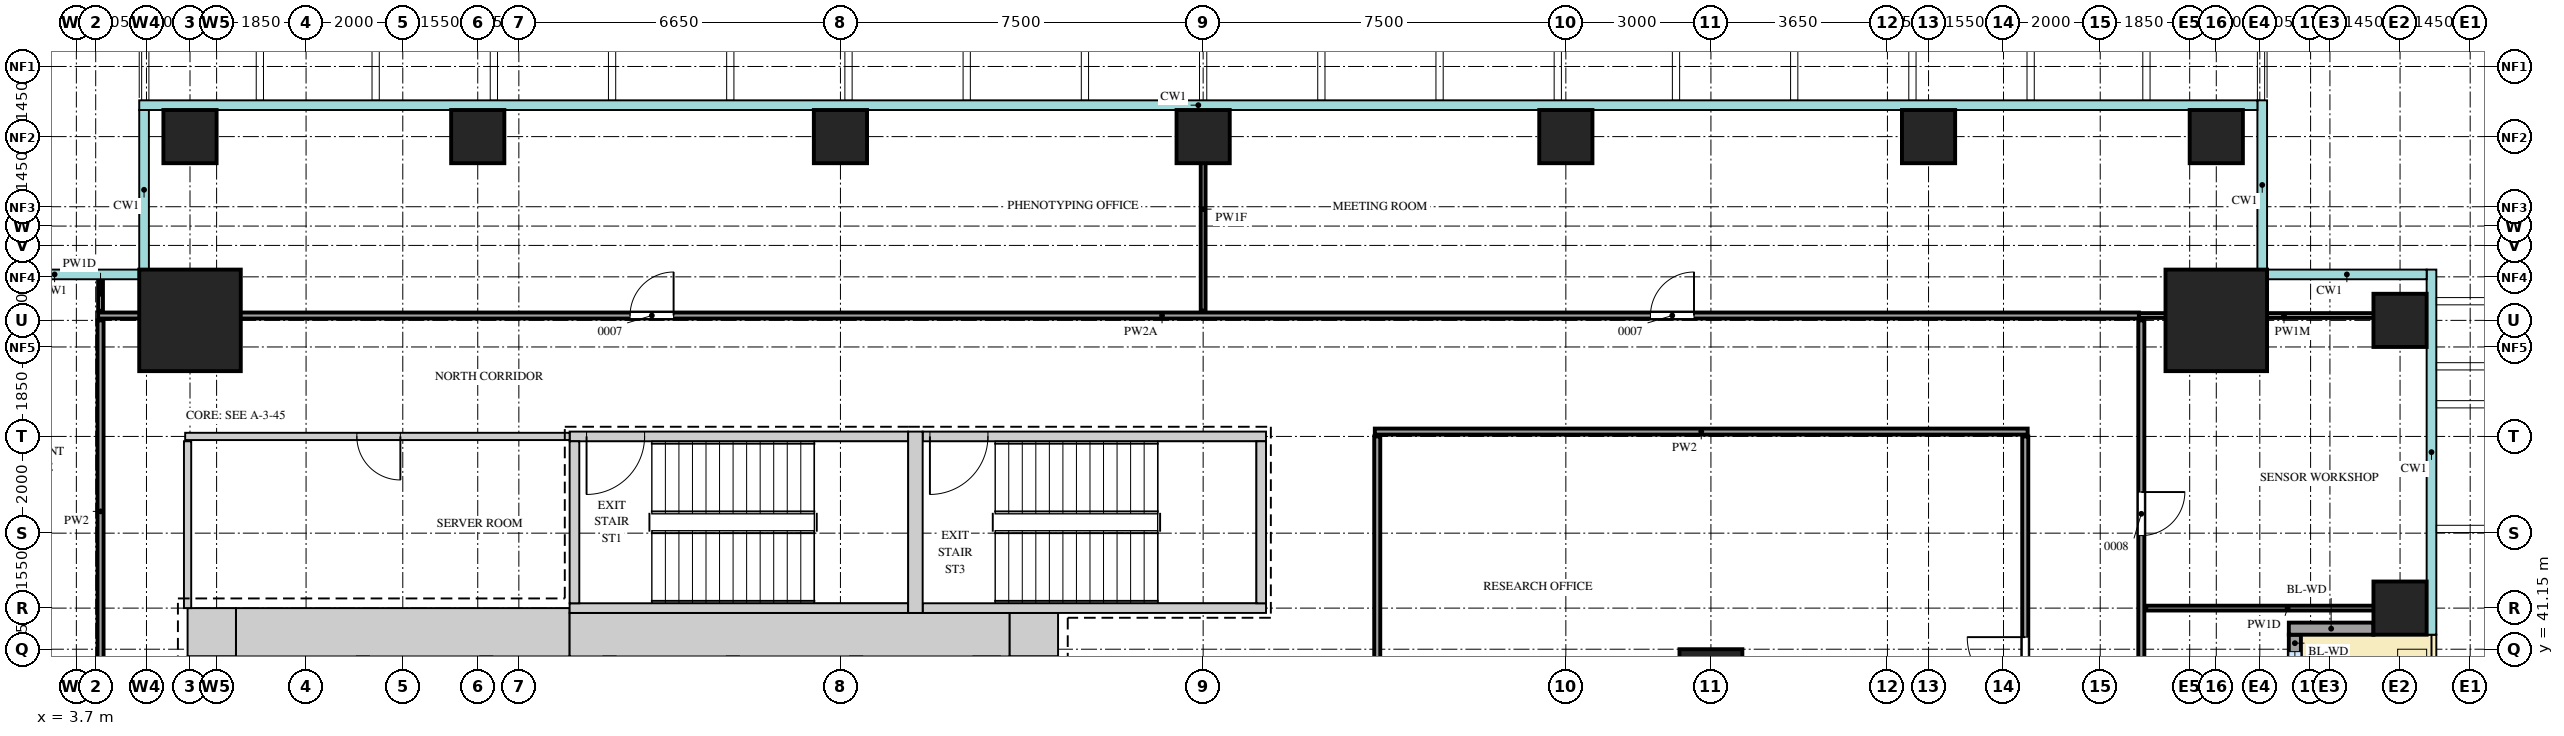
"""IFC4 building model, lengths in metres.
Left out: names, types, materials, properties, quantities, classifications, styles, units other than length and angle.
Written with IfcOpenShell. Run it as: python <this file> out.ifc"""

import sys

from ifc_helpers import new_model, si_unit, direction, frame, frame_2d, origin, origin_2d, place, context, subcontext, project, spatial, rectangle, extrude, source, transform, mapped, element, fill, save


model = new_model("IFC4")
c1 = context("Model", 3, precision=1e-05, world=origin(), true_north=direction((0.0, 1.0)))
c2 = subcontext(c1, "Body", "Model", "MODEL_VIEW")
j1 = project(units=[si_unit("LENGTHUNIT", "METRE"), si_unit("PLANEANGLEUNIT", "RADIAN")], contexts=[c1])
p1 = place(None, origin())
s1 = spatial("IfcSite", under=j1, at=p1, CompositionType="ELEMENT")
p2 = place(p1, origin())
s2 = spatial("IfcBuilding", under=s1, at=p2, CompositionType="ELEMENT")
p3 = place(p2, frame((0.0, 0.0, 127.9)))
s3 = spatial("IfcBuildingStorey", under=s2, at=p3, CompositionType="ELEMENT", Elevation=127.9)
m1 = source(origin(), c2, "Body", "SweptSolid", [
    extrude(rectangle(XDim=6.9, YDim=1.0, at=frame_2d((3.45, 0.0))), origin(), (0.0, 0.0, 1.0), 4.1),
])
p4 = place(p3, frame((7.0, 41.5, 0.0), z_axis=(0.0, 0.0, 1.0), x_axis=(1.0, 0.0, 0.0)))
e1 = element("IfcWall", 1, at=p4, inside=s3, PredefinedType="SHEAR", context=c2, shape_type="MappedRepresentation", body=[
    mapped(m1, transform((0.0, 0.0, 0.0))),
])
m2 = source(origin(), c2, "Body", "SweptSolid", [
    extrude(rectangle(XDim=9.1, YDim=0.9, at=frame_2d((4.55, 0.0))), origin(), (0.0, 0.0, 1.0), 4.1),
])
p5 = place(p3, frame((13.9, 41.45, 0.0), z_axis=(0.0, 0.0, 1.0), x_axis=(1.0, 0.0, 0.0)))
e2 = element("IfcWall", 2, at=p5, inside=s3, PredefinedType="SHEAR", context=c2, shape_type="MappedRepresentation", body=[
    mapped(m2, transform((0.0, 0.0, 0.0))),
])
m3 = source(origin(), c2, "Body", "SweptSolid", [
    extrude(rectangle(XDim=1.0, YDim=0.9, at=frame_2d((0.5, 0.0))), origin(), (0.0, 0.0, 1.0), 4.1),
])
p6 = place(p3, frame((23.0, 41.45, 0.0), z_axis=(0.0, 0.0, 1.0), x_axis=(1.0, 0.0, 0.0)))
e3 = element("IfcWall", 3, at=p6, inside=s3, PredefinedType="SHEAR", context=c2, shape_type="MappedRepresentation", body=[
    mapped(m3, transform((0.0, 0.0, 0.0))),
])
m4 = source(origin(), c2, "Body", "SweptSolid", [
    extrude(rectangle(XDim=1.0, YDim=1.0, at=frame_2d((0.5, 0.0))), origin(), (0.0, 0.0, 1.0), 4.1),
])
p7 = place(p3, frame((6.0, 41.5, 0.0), z_axis=(0.0, 0.0, 1.0), x_axis=(1.0, 0.0, 0.0)))
e4 = element("IfcWall", 4, at=p7, inside=s3, PredefinedType="SHEAR", context=c2, shape_type="MappedRepresentation", body=[
    mapped(m4, transform((0.0, 0.0, 0.0))),
])
m5 = source(origin(), c2, "Body", "SweptSolid", [
    extrude(rectangle(XDim=7.0, YDim=0.2, at=frame_2d((3.5, 0.0))), origin(), (0.0, 0.0, 1.0), 4.1),
])
p8 = place(p3, frame((13.9, 45.55, 0.0), z_axis=(0.0, 0.0, 1.0), x_axis=(1.0, 0.0, 0.0)))
e5 = element("IfcWall", 5, at=p8, inside=s3, PredefinedType="SHEAR", context=c2, shape_type="MappedRepresentation", body=[
    mapped(m5, transform((0.0, 0.0, 0.0))),
])
m6 = source(origin(), c2, "Body", "SweptSolid", [
    extrude(rectangle(XDim=1.2, YDim=2.1, at=frame_2d((0.6, 1.05))), frame((0.0, 0.11, 0.0), z_axis=(0.0, -1.0, 0.0), x_axis=(1.0, 0.0, 0.0)), (0.0, 0.0, 1.0), 0.22),
])
p9 = place(p8, frame((0.35, 0.0, 0.0)))
e6 = element("IfcOpeningElement", 6, at=p9, cuts=e5, PredefinedType="OPENING", context=c2, shape_type="MappedRepresentation", body=[
    mapped(m6, transform((0.0, 0.0, 0.0))),
])
p10 = place(p3, frame((13.9, 42.0, 0.0), z_axis=(0.0, 0.0, 1.0), x_axis=(1.0, 0.0, 0.0)))
e7 = element("IfcWall", 7, at=p10, inside=s3, PredefinedType="SHEAR", context=c2, shape_type="MappedRepresentation", body=[
    mapped(m5, transform((0.0, 0.0, 0.0))),
])
m7 = source(origin(), c2, "Body", "SweptSolid", [
    extrude(rectangle(XDim=7.1, YDim=0.2, at=frame_2d((3.55, 0.0))), origin(), (0.0, 0.0, 1.0), 4.1),
])
p11 = place(p3, frame((21.2, 45.55, 0.0), z_axis=(0.0, 0.0, 1.0), x_axis=(1.0, 0.0, 0.0)))
e8 = element("IfcWall", 8, at=p11, inside=s3, PredefinedType="SHEAR", context=c2, shape_type="MappedRepresentation", body=[
    mapped(m7, transform((0.0, 0.0, 0.0))),
])
p12 = place(p11, frame((0.15, 0.0, 0.0)))
e9 = element("IfcOpeningElement", 9, at=p12, cuts=e8, PredefinedType="OPENING", context=c2, shape_type="MappedRepresentation", body=[
    mapped(m6, transform((0.0, 0.0, 0.0))),
])
p13 = place(p3, frame((21.2, 42.0, 0.0), z_axis=(0.0, 0.0, 1.0), x_axis=(1.0, 0.0, 0.0)))
e10 = element("IfcWall", 10, at=p13, inside=s3, PredefinedType="SHEAR", context=c2, shape_type="MappedRepresentation", body=[
    mapped(m7, transform((0.0, 0.0, 0.0))),
])
m8 = source(origin(), c2, "Body", "SweptSolid", [
    extrude(rectangle(XDim=3.75, YDim=0.3, at=frame_2d((1.875, 0.0))), origin(), (0.0, 0.0, 1.0), 4.1),
])
p14 = place(p3, frame((21.05, 41.9, 0.0), z_axis=(0.0, 0.0, 1.0), x_axis=(0.0, 1.0, 0.0)))
e11 = element("IfcWall", 11, at=p14, inside=s3, PredefinedType="SHEAR", context=c2, shape_type="MappedRepresentation", body=[
    mapped(m8, transform((0.0, 0.0, 0.0))),
])
m9 = source(origin(), c2, "Body", "SweptSolid", [
    extrude(rectangle(XDim=3.35, YDim=0.2, at=frame_2d((1.675, 0.0))), origin(), (0.0, 0.0, 1.0), 4.1),
])
for number, where, z_axis, x_axis in (
    (12, (14.0, 42.1, 0.0), (0.0, 0.0, 1.0), (0.0, 1.0, 0.0)),
    (13, (28.2, 42.1, 0.0), (0.0, 0.0, 1.0), (0.0, 1.0, 0.0)),
):
    element("IfcWall", number, at=place(p3, frame(where, z_axis=z_axis, x_axis=x_axis)), inside=s3, PredefinedType="SHEAR", context=c2, shape_type="MappedRepresentation", body=[
        mapped(m9, transform((0.0, 0.0, 0.0))),
    ])
m10 = source(origin(), c2, "Body", "SweptSolid", [
    extrude(rectangle(XDim=2.1, YDim=2.1, at=origin_2d()), origin(), (0.0, 0.0, 1.0), 4.4),
])
for number, where, z_axis, x_axis in (
    (14, (47.95, 47.95, 0.0), (0.0, 0.0, 1.0), (1.0, 0.0, 0.0)),
    (15, (6.05, 47.95, 0.0), (0.0, 0.0, 1.0), (1.0, 0.0, 0.0)),
):
    element("IfcColumn", number, at=place(p3, frame(where, z_axis=z_axis, x_axis=x_axis)), inside=s3, PredefinedType="COLUMN", context=c2, shape_type="MappedRepresentation", body=[
        mapped(m10, transform((0.0, 0.0, 0.0))),
    ])
m11 = source(origin(), c2, "Body", "SweptSolid", [
    extrude(rectangle(XDim=1.1, YDim=1.1, at=origin_2d()), origin(), (0.0, 0.0, 1.0), 4.1),
])
for number, where, z_axis, x_axis in (
    (16, (51.75, 42.0, 0.0), (0.0, 0.0, 1.0), (1.0, 0.0, 0.0)),
    (17, (51.75, 47.95, 0.0), (0.0, 0.0, 1.0), (1.0, 0.0, 0.0)),
    (18, (6.05, 51.75, 0.0), (0.0, 0.0, 1.0), (1.0, 0.0, 0.0)),
    (19, (12.0, 51.75, 0.0), (0.0, 0.0, 1.0), (1.0, 0.0, 0.0)),
    (20, (19.5, 51.75, 0.0), (0.0, 0.0, 1.0), (1.0, 0.0, 0.0)),
    (21, (27.0, 51.75, 0.0), (0.0, 0.0, 1.0), (1.0, 0.0, 0.0)),
    (22, (34.5, 51.75, 0.0), (0.0, 0.0, 1.0), (1.0, 0.0, 0.0)),
    (23, (42.0, 51.75, 0.0), (0.0, 0.0, 1.0), (1.0, 0.0, 0.0)),
    (24, (47.95, 51.75, 0.0), (0.0, 0.0, 1.0), (1.0, 0.0, 0.0)),
):
    element("IfcColumn", number, at=place(p3, frame(where, z_axis=z_axis, x_axis=x_axis)), inside=s3, PredefinedType="COLUMN", context=c2, shape_type="MappedRepresentation", body=[
        mapped(m11, transform((0.0, 0.0, 0.0))),
    ])
m12 = source(origin(), c2, "Body", "SweptSolid", [
    extrude(rectangle(XDim=1.3, YDim=1.3, at=origin_2d()), origin(), (0.0, 0.0, 1.0), 4.1),
])
p15 = place(p3, frame((37.5, 40.5, 0.0), z_axis=(0.0, 0.0, 1.0), x_axis=(1.0, 0.0, 0.0)))
e25 = element("IfcColumn", 25, at=p15, inside=s3, PredefinedType="COLUMN", context=c2, shape_type="MappedRepresentation", body=[
    mapped(m12, transform((0.0, 0.0, 0.0))),
])
m13 = source(origin(), c2, "Body", "SweptSolid", [
    extrude(rectangle(XDim=6.4, YDim=0.25, at=frame_2d((3.2, 0.0))), origin(), (0.0, 0.0, 1.0), 3.55),
])
p16 = place(p3, frame((49.575, 35.05, 0.0), z_axis=(0.0, 0.0, 1.0), x_axis=(0.0, 1.0, 0.0)))
e26 = element("IfcWall", 26, at=p16, inside=s3, PredefinedType="SOLIDWALL", context=c2, shape_type="MappedRepresentation", body=[
    mapped(m13, transform((0.0, 0.0, 0.0))),
])
m14 = source(origin(), c2, "Body", "SweptSolid", [
    extrude(rectangle(XDim=1.65, YDim=2.4, at=frame_2d((0.825, 1.2))), frame((0.0, 0.135, 0.0), z_axis=(0.0, -1.0, 0.0), x_axis=(1.0, 0.0, 0.0)), (0.0, 0.0, 1.0), 0.27),
])
p17 = place(p16, frame((0.35, 0.0, 0.0)))
e27 = element("IfcOpeningElement", 27, at=p17, cuts=e26, PredefinedType="OPENING", context=c2, shape_type="MappedRepresentation", body=[
    mapped(m14, transform((0.0, 0.0, 0.0))),
])
p18 = place(p16, frame((4.4, 0.0, 0.0)))
e28 = element("IfcOpeningElement", 28, at=p18, cuts=e26, PredefinedType="OPENING", context=c2, shape_type="MappedRepresentation", body=[
    mapped(m14, transform((0.0, 0.0, 0.0))),
])
m15 = source(origin(), c2, "Body", "SweptSolid", [
    extrude(rectangle(XDim=1.8, YDim=2.4, at=frame_2d((0.9, 1.2))), frame((0.0, 0.135, 0.0), z_axis=(0.0, -1.0, 0.0), x_axis=(1.0, 0.0, 0.0)), (0.0, 0.0, 1.0), 0.27),
])
p19 = place(p16, frame((2.3, 0.0, 0.0)))
e29 = element("IfcOpeningElement", 29, at=p19, cuts=e26, PredefinedType="OPENING", context=c2, shape_type="MappedRepresentation", body=[
    mapped(m15, transform((0.0, 0.0, 0.0))),
])
m16 = source(origin(), c2, "Body", "SweptSolid", [
    extrude(rectangle(XDim=1.75, YDim=0.25, at=frame_2d((0.875, 0.0))), origin(), (0.0, 0.0, 1.0), 3.55),
])
p20 = place(p3, frame((51.2, 41.575, 0.0), z_axis=(0.0, 0.0, 1.0), x_axis=(-1.0, 0.0, 0.0)))
e30 = element("IfcWall", 30, at=p20, inside=s3, PredefinedType="SOLIDWALL", context=c2, shape_type="MappedRepresentation", body=[
    mapped(m16, transform((0.0, 0.0, 0.0))),
])
m17 = source(origin(), c2, "Body", "SweptSolid", [
    extrude(rectangle(XDim=37.65, YDim=0.125, at=frame_2d((18.825, 0.0))), origin(), (0.0, 0.0, 1.0), 4.2),
])
p21 = place(p3, frame((46.4, 10.3, 0.0), z_axis=(0.0, 0.0, 1.0), x_axis=(0.0, 1.0, 0.0)))
e31 = element("IfcWall", 31, at=p21, inside=s3, PredefinedType="PARTITIONING", context=c2, shape_type="MappedRepresentation", body=[
    mapped(m17, transform((0.0, 0.0, 0.0))),
])
m18 = source(origin(), c2, "Body", "SweptSolid", [
    extrude(rectangle(XDim=1.2, YDim=2.1, at=frame_2d((0.6, 1.05))), frame((0.0, 0.073, 0.0), z_axis=(0.0, -1.0, 0.0), x_axis=(1.0, 0.0, 0.0)), (0.0, 0.0, 1.0), 0.145),
])
p22 = place(p21, frame((7.85, 0.0, 0.0)))
e32 = element("IfcOpeningElement", 32, at=p22, cuts=e31, PredefinedType="OPENING", context=c2, shape_type="MappedRepresentation", body=[
    mapped(m18, transform((0.0, 0.0, 0.0))),
])
m19 = source(origin(), c2, "Body", "SweptSolid", [
    extrude(rectangle(XDim=0.9, YDim=2.1, at=frame_2d((0.45, 1.05))), frame((0.0, 0.073, 0.0), z_axis=(0.0, -1.0, 0.0), x_axis=(1.0, 0.0, 0.0)), (0.0, 0.0, 1.0), 0.145),
])
p23 = place(p21, frame((23.6, 0.0, 0.0)))
e33 = element("IfcOpeningElement", 33, at=p23, cuts=e31, PredefinedType="OPENING", context=c2, shape_type="MappedRepresentation", body=[
    mapped(m19, transform((0.0, 0.0, 0.0))),
])
p24 = place(p21, frame((33.2, 0.0, 0.0)))
e34 = element("IfcOpeningElement", 34, at=p24, cuts=e31, PredefinedType="OPENING", context=c2, shape_type="MappedRepresentation", body=[
    mapped(m19, transform((0.0, 0.0, 0.0))),
])
m20 = source(origin(), c2, "Body", "SweptSolid", [
    extrude(rectangle(XDim=27.45, YDim=0.125, at=frame_2d((13.725, 0.0))), origin(), (0.0, 0.0, 1.0), 4.2),
])
p25 = place(p3, frame((44.0, 18.1, 0.0), z_axis=(0.0, 0.0, 1.0), x_axis=(0.0, 1.0, 0.0)))
e35 = element("IfcWall", 35, at=p25, inside=s3, PredefinedType="PARTITIONING", context=c2, shape_type="MappedRepresentation", body=[
    mapped(m20, transform((0.0, 0.0, 0.0))),
])
p26 = place(p25, frame((8.3, 0.0, 0.0)))
e36 = element("IfcOpeningElement", 36, at=p26, cuts=e35, PredefinedType="OPENING", context=c2, shape_type="MappedRepresentation", body=[
    mapped(m18, transform((0.0, 0.0, 0.0))),
])
p27 = place(p25, frame((22.1, 0.0, 0.0)))
e37 = element("IfcOpeningElement", 37, at=p27, cuts=e35, PredefinedType="OPENING", context=c2, shape_type="MappedRepresentation", body=[
    mapped(m18, transform((0.0, 0.0, 0.0))),
])
m21 = source(origin(), c2, "Body", "SweptSolid", [
    extrude(rectangle(XDim=13.75, YDim=0.125, at=frame_2d((6.875, 0.0))), origin(), (0.0, 0.0, 1.0), 4.2),
])
p28 = place(p3, frame((4.2, 34.2, 0.0), z_axis=(0.0, 0.0, 1.0), x_axis=(0.0, 1.0, 0.0)))
e38 = element("IfcWall", 38, at=p28, inside=s3, PredefinedType="PARTITIONING", context=c2, shape_type="MappedRepresentation", body=[
    mapped(m21, transform((0.0, 0.0, 0.0))),
])
p29 = place(p28, frame((4.95, 0.0, 0.0)))
e39 = element("IfcOpeningElement", 39, at=p29, cuts=e38, PredefinedType="OPENING", context=c2, shape_type="MappedRepresentation", body=[
    mapped(m19, transform((0.0, 0.0, 0.0))),
])
m22 = source(origin(), c2, "Body", "SweptSolid", [
    extrude(rectangle(XDim=9.45, YDim=0.125, at=frame_2d((4.725, 0.0))), origin(), (0.0, 0.0, 1.0), 4.2),
])
p30 = place(p3, frame((30.6, 36.1, 0.0), z_axis=(0.0, 0.0, 1.0), x_axis=(0.0, 1.0, 0.0)))
e40 = element("IfcWall", 40, at=p30, inside=s3, PredefinedType="PARTITIONING", context=c2, shape_type="MappedRepresentation", body=[
    mapped(m22, transform((0.0, 0.0, 0.0))),
])
m23 = source(origin(), c2, "Body", "SweptSolid", [
    extrude(rectangle(XDim=3.45, YDim=0.15, at=frame_2d((1.725, 0.0))), origin(), (0.0, 0.0, 1.0), 4.2),
])
p31 = place(p3, frame((6.0, 42.0, 0.0), z_axis=(0.0, 0.0, 1.0), x_axis=(0.0, 1.0, 0.0)))
e41 = element("IfcWall", 41, at=p31, inside=s3, PredefinedType="PARTITIONING", context=c2, shape_type="MappedRepresentation", body=[
    mapped(m23, transform((0.0, 0.0, 0.0))),
])
m24 = source(origin(), c2, "Body", "SweptSolid", [
    extrude(rectangle(XDim=5.85, YDim=0.1, at=frame_2d((2.925, 0.0))), origin(), (0.0, 0.0, 1.0), 4.2),
])
p32 = place(p3, frame((46.5, 42.0, 0.0), z_axis=(0.0, 0.0, 1.0), x_axis=(1.0, 0.0, 0.0)))
e42 = element("IfcWall", 42, at=p32, inside=s3, PredefinedType="PARTITIONING", context=c2, shape_type="MappedRepresentation", body=[
    mapped(m24, transform((0.0, 0.0, 0.0))),
])
m25 = source(origin(), c2, "Body", "SweptSolid", [
    extrude(rectangle(XDim=7.95, YDim=0.15, at=frame_2d((3.975, 0.0))), origin(), (0.0, 0.0, 1.0), 4.2),
])
p33 = place(p3, frame((5.95, 45.55, 0.0), z_axis=(0.0, 0.0, 1.0), x_axis=(1.0, 0.0, 0.0)))
e43 = element("IfcWall", 43, at=p33, inside=s3, PredefinedType="PARTITIONING", context=c2, shape_type="MappedRepresentation", body=[
    mapped(m25, transform((0.0, 0.0, 0.0))),
])
m26 = source(origin(), c2, "Body", "SweptSolid", [
    extrude(rectangle(XDim=0.9, YDim=2.1, at=frame_2d((0.45, 1.05))), frame((0.0, 0.085, 0.0), z_axis=(0.0, -1.0, 0.0), x_axis=(1.0, 0.0, 0.0)), (0.0, 0.0, 1.0), 0.17),
])
p34 = place(p33, frame((3.55, 0.0, 0.0)))
e44 = element("IfcOpeningElement", 44, at=p34, cuts=e43, PredefinedType="OPENING", context=c2, shape_type="MappedRepresentation", body=[
    mapped(m26, transform((0.0, 0.0, 0.0))),
])
m27 = source(origin(), c2, "Body", "SweptSolid", [
    extrude(rectangle(XDim=13.5, YDim=0.125, at=frame_2d((6.75, 0.0))), origin(), (0.0, 0.0, 1.0), 4.2),
])
p35 = place(p3, frame((30.55, 45.65, 0.0), z_axis=(0.0, 0.0, 1.0), x_axis=(1.0, 0.0, 0.0)))
e45 = element("IfcWall", 45, at=p35, inside=s3, PredefinedType="PARTITIONING", context=c2, shape_type="MappedRepresentation", body=[
    mapped(m27, transform((0.0, 0.0, 0.0))),
])
m28 = source(origin(), c2, "Body", "SweptSolid", [
    extrude(rectangle(XDim=42.2, YDim=0.125, at=frame_2d((21.1, 0.0))), origin(), (0.0, 0.0, 1.0), 3.55),
])
p36 = place(p3, frame((4.15, 48.05, 0.0), z_axis=(0.0, 0.0, 1.0), x_axis=(1.0, 0.0, 0.0)))
e46 = element("IfcWall", 46, at=p36, inside=s3, PredefinedType="PARTITIONING", context=c2, shape_type="MappedRepresentation", body=[
    mapped(m28, transform((0.0, 0.0, 0.0))),
])
p37 = place(p36, frame((11.0, 0.0, 0.0)))
e47 = element("IfcOpeningElement", 47, at=p37, cuts=e46, PredefinedType="OPENING", context=c2, shape_type="MappedRepresentation", body=[
    mapped(m19, transform((0.0, 0.0, 0.0))),
])
p38 = place(p36, frame((32.1, 0.0, 0.0)))
e48 = element("IfcOpeningElement", 48, at=p38, cuts=e46, PredefinedType="OPENING", context=c2, shape_type="MappedRepresentation", body=[
    mapped(m19, transform((0.0, 0.0, 0.0))),
])
m29 = source(origin(), c2, "Body", "SweptSolid", [
    extrude(rectangle(XDim=6.0, YDim=0.1, at=frame_2d((3.0, 0.0))), origin(), (0.0, 0.0, 1.0), 3.55),
])
p39 = place(p3, frame((46.35, 48.05, 0.0), z_axis=(0.0, 0.0, 1.0), x_axis=(1.0, 0.0, 0.0)))
e49 = element("IfcWall", 49, at=p39, inside=s3, PredefinedType="PARTITIONING", context=c2, shape_type="MappedRepresentation", body=[
    mapped(m29, transform((0.0, 0.0, 0.0))),
])
m30 = source(origin(), c2, "Body", "SweptSolid", [
    extrude(rectangle(XDim=0.7, YDim=0.1, at=frame_2d((0.35, 0.0))), origin(), (0.0, 0.0, 1.0), 4.2),
])
p40 = place(p3, frame((4.2, 48.15, 0.0), z_axis=(0.0, 0.0, 1.0), x_axis=(0.0, 1.0, 0.0)))
e50 = element("IfcWall", 50, at=p40, inside=s3, PredefinedType="PARTITIONING", context=c2, shape_type="MappedRepresentation", body=[
    mapped(m30, transform((0.0, 0.0, 0.0))),
])
m31 = source(origin(), c2, "Body", "SweptSolid", [
    extrude(rectangle(XDim=4.2, YDim=0.1, at=frame_2d((2.1, 0.0))), origin(), (0.0, 0.0, 1.0), 3.77),
])
p41 = place(p3, frame((27.0, 48.15, 0.0), z_axis=(0.0, 0.0, 1.0), x_axis=(0.0, 1.0, 0.0)))
e51 = element("IfcWall", 51, at=p41, inside=s3, PredefinedType="PARTITIONING", context=c2, shape_type="MappedRepresentation", body=[
    mapped(m31, transform((0.0, 0.0, 0.0))),
])
m32 = source(origin(), c2, "Body", "SweptSolid", [
    extrude(rectangle(XDim=1.65, YDim=2.4, at=frame_2d((0.825, 1.2))), frame((0.0, 0.03, 0.0), z_axis=(0.0, -1.0, 0.0), x_axis=(1.0, 0.0, 0.0)), (0.0, 0.0, 1.0), 0.06),
])
p42 = place(p18, origin())
e52 = element("IfcWindow", 52, at=p42, inside=s3, PartitioningType="SINGLE_PANEL", PredefinedType="WINDOW", context=c2, shape_type="MappedRepresentation", body=[
    mapped(m32, transform((0.0, 0.0, 0.0))),
])
fill(e28, e52)
m33 = source(origin(), c2, "Body", "SweptSolid", [
    extrude(rectangle(XDim=1.2, YDim=2.1, at=frame_2d((0.6, 1.05))), frame((0.0, 0.025, 0.0), z_axis=(0.0, -1.0, 0.0), x_axis=(1.0, 0.0, 0.0)), (0.0, 0.0, 1.0), 0.05),
])
p43 = place(p27, origin())
e53 = element("IfcDoor", 53, at=p43, inside=s3, OperationType="SINGLE_SWING_LEFT", PredefinedType="DOOR", context=c2, shape_type="MappedRepresentation", body=[
    mapped(m33, transform((0.0, 0.0, 0.0))),
])
fill(e37, e53)
m34 = source(origin(), c2, "Body", "SweptSolid", [
    extrude(rectangle(XDim=0.9, YDim=2.1, at=frame_2d((0.45, 1.05))), frame((0.0, 0.025, 0.0), z_axis=(0.0, -1.0, 0.0), x_axis=(1.0, 0.0, 0.0)), (0.0, 0.0, 1.0), 0.05),
])
p44 = place(p24, origin())
e54 = element("IfcDoor", 54, at=p44, inside=s3, OperationType="SINGLE_SWING_RIGHT", PredefinedType="DOOR", context=c2, shape_type="MappedRepresentation", body=[
    mapped(m34, transform((0.0, 0.0, 0.0))),
])
fill(e34, e54)
p45 = place(p37, origin())
e55 = element("IfcDoor", 55, at=p45, inside=s3, OperationType="SINGLE_SWING_LEFT", PredefinedType="DOOR", context=c2, shape_type="MappedRepresentation", body=[
    mapped(m34, transform((0.0, 0.0, 0.0))),
])
fill(e47, e55)
p46 = place(p38, origin())
e56 = element("IfcDoor", 56, at=p46, inside=s3, OperationType="SINGLE_SWING_LEFT", PredefinedType="DOOR", context=c2, shape_type="MappedRepresentation", body=[
    mapped(m34, transform((0.0, 0.0, 0.0))),
])
fill(e48, e56)
p47 = place(p34, origin())
e57 = element("IfcDoor", 57, at=p47, inside=s3, OperationType="SINGLE_SWING_RIGHT", PredefinedType="DOOR", context=c2, shape_type="MappedRepresentation", body=[
    mapped(m34, transform((0.0, 0.0, 0.0))),
])
fill(e44, e57)
p48 = place(p9, origin())
e58 = element("IfcDoor", 58, at=p48, inside=s3, OperationType="SINGLE_SWING_LEFT", PredefinedType="DOOR", context=c2, shape_type="MappedRepresentation", body=[
    mapped(m33, transform((0.0, 0.0, 0.0))),
])
fill(e6, e58)
p49 = place(p12, origin())
e59 = element("IfcDoor", 59, at=p49, inside=s3, OperationType="SINGLE_SWING_LEFT", PredefinedType="DOOR", context=c2, shape_type="MappedRepresentation", body=[
    mapped(m33, transform((0.0, 0.0, 0.0))),
])
fill(e9, e59)
save(model, sys.argv[1])
